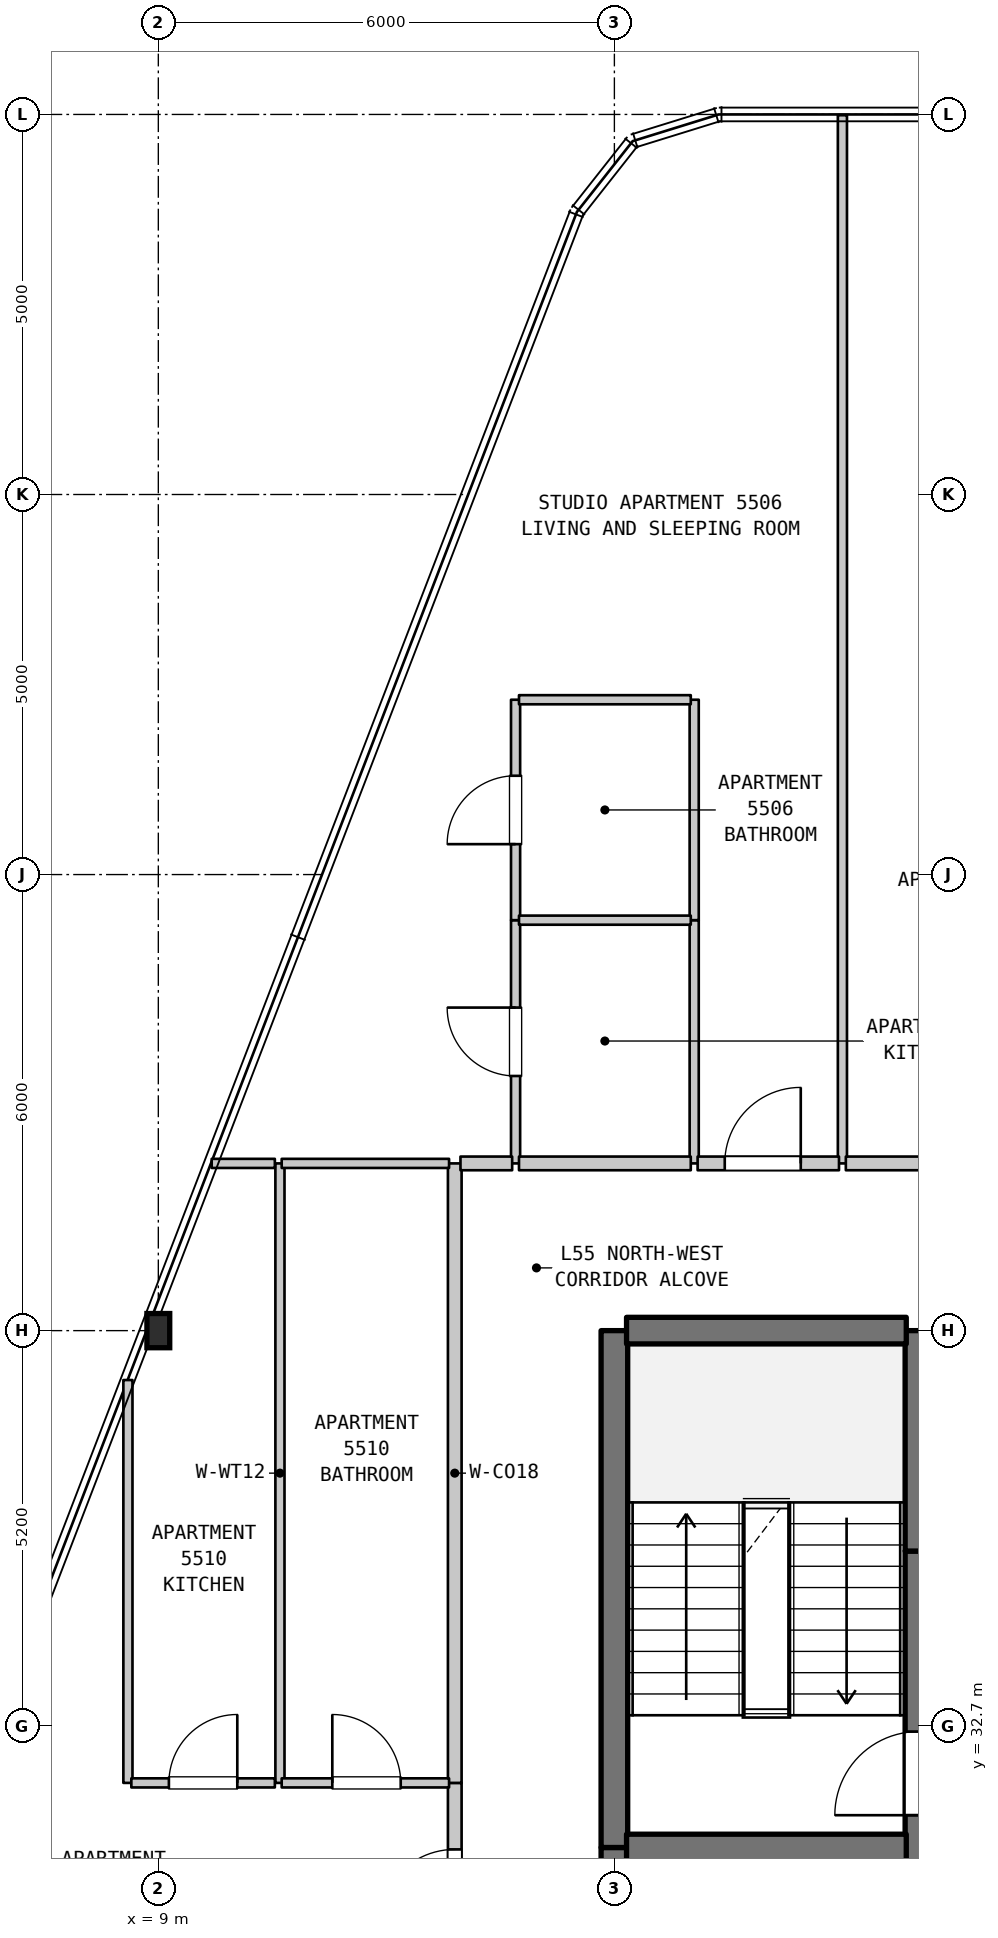
"""IFC4 building model, lengths in metres.
Left out: names, types, materials, properties, quantities, classifications, styles, units other than length and angle.
Written with IfcOpenShell. Run it as: python <this file> out.ifc"""

import sys

from ifc_helpers import new_model, si_unit, direction, frame, frame_2d, origin, origin_2d, place, context, subcontext, project, spatial, rectangle, i_section, extrude, element, fill, save


model = new_model("IFC4")
c1 = context("Model", 3, precision=1e-05, world=origin(), true_north=direction((0.0, 1.0)))
c2 = subcontext(c1, "Body", "Model", "MODEL_VIEW")
j1 = project(units=[si_unit("LENGTHUNIT", "METRE"), si_unit("PLANEANGLEUNIT", "RADIAN")], contexts=[c1])
p1 = place(None, origin())
s1 = spatial("IfcSite", under=j1, at=p1, CompositionType="ELEMENT")
p2 = place(p1, origin())
s2 = spatial("IfcBuilding", under=s1, at=p2, CompositionType="ELEMENT")
p3 = place(p2, frame((0.0, 0.0, 222.8)))
s3 = spatial("IfcBuildingStorey", under=s2, at=p3, CompositionType="ELEMENT", Elevation=222.8)
p4 = place(p3, frame((9.0, 37.9, 0.0), z_axis=(0.0, 0.0, 1.0), x_axis=(1.0, 0.0, 0.0)))
e1 = element("IfcColumn", 1, at=p4, inside=s3, PredefinedType="COLUMN", context=c2, shape_type="SweptSolid", body=[
    extrude(i_section(OverallWidth=0.3, OverallDepth=0.45, WebThickness=0.014, FlangeThickness=0.026, FilletRadius=0.027, at=origin_2d()), origin(), (0.0, 0.0, 1.0), 3.7),
])
p5 = place(p3, frame((8.6, 31.95, 0.0), z_axis=(0.0, 0.0, 1.0), x_axis=(0.0, 1.0, 0.0)))
e2 = element("IfcWall", 2, at=p5, inside=s3, PredefinedType="PARTITIONING", context=c2, shape_type="SweptSolid", body=[
    extrude(rectangle(XDim=5.3, YDim=0.12, at=frame_2d((2.65, 0.0))), origin(), (0.0, 0.0, 1.0), 3.39),
])
p6 = place(p3, frame((10.6, 31.95, 0.0), z_axis=(0.0, 0.0, 1.0), x_axis=(0.0, 1.0, 0.0)))
e3 = element("IfcWall", 3, at=p6, inside=s3, PredefinedType="PARTITIONING", context=c2, shape_type="SweptSolid", body=[
    extrude(rectangle(XDim=8.15, YDim=0.12, at=frame_2d((4.075, 0.0))), origin(), (0.0, 0.0, 1.0), 3.39),
])
p7 = place(p3, frame((12.9, 29.2, 0.0), z_axis=(0.0, 0.0, 1.0), x_axis=(0.0, 1.0, 0.0)))
e4 = element("IfcWall", 4, at=p7, inside=s3, PredefinedType="STANDARD", context=c2, shape_type="SweptSolid", body=[
    extrude(rectangle(XDim=2.75, YDim=0.18, at=frame_2d((1.375, 0.0))), origin(), (0.0, 0.0, 1.0), 3.39),
])
p8 = place(p7, frame((0.875, 0.0, 0.0)))
e5 = element("IfcOpeningElement", 5, at=p8, cuts=e4, PredefinedType="OPENING", context=c2, shape_type="SweptSolid", body=[
    extrude(rectangle(XDim=1.0, YDim=2.15, at=frame_2d((0.5, 1.075))), frame((0.0, 0.1, 0.0), z_axis=(0.0, -1.0, 0.0), x_axis=(1.0, 0.0, 0.0)), (0.0, 0.0, 1.0), 0.2),
])
p9 = place(p3, frame((12.9, 31.95, 0.0), z_axis=(0.0, 0.0, 1.0), x_axis=(0.0, 1.0, 0.0)))
e6 = element("IfcWall", 6, at=p9, inside=s3, PredefinedType="STANDARD", context=c2, shape_type="SweptSolid", body=[
    extrude(rectangle(XDim=8.15, YDim=0.18, at=frame_2d((4.075, 0.0))), origin(), (0.0, 0.0, 1.0), 3.39),
])
p10 = place(p3, frame((13.7, 40.1, 0.0), z_axis=(0.0, 0.0, 1.0), x_axis=(0.0, 1.0, 0.0)))
e7 = element("IfcWall", 7, at=p10, inside=s3, PredefinedType="PARTITIONING", context=c2, shape_type="SweptSolid", body=[
    extrude(rectangle(XDim=3.2, YDim=0.12, at=frame_2d((1.6, 0.0))), origin(), (0.0, 0.0, 1.0), 3.39),
])
p11 = place(p10, frame((1.15, 0.0, 0.0)))
e8 = element("IfcOpeningElement", 8, at=p11, cuts=e7, PredefinedType="OPENING", context=c2, shape_type="SweptSolid", body=[
    extrude(rectangle(XDim=0.9, YDim=2.15, at=frame_2d((0.45, 1.075))), frame((0.0, 0.07, 0.0), z_axis=(0.0, -1.0, 0.0), x_axis=(1.0, 0.0, 0.0)), (0.0, 0.0, 1.0), 0.14),
])
p12 = place(p3, frame((13.7, 43.3, 0.0), z_axis=(0.0, 0.0, 1.0), x_axis=(0.0, 1.0, 0.0)))
e9 = element("IfcWall", 9, at=p12, inside=s3, PredefinedType="PARTITIONING", context=c2, shape_type="SweptSolid", body=[
    extrude(rectangle(XDim=2.9, YDim=0.12, at=frame_2d((1.45, 0.0))), origin(), (0.0, 0.0, 1.0), 3.39),
])
p13 = place(p12, frame((1.0, 0.0, 0.0)))
e10 = element("IfcOpeningElement", 10, at=p13, cuts=e9, PredefinedType="OPENING", context=c2, shape_type="SweptSolid", body=[
    extrude(rectangle(XDim=0.9, YDim=2.1, at=frame_2d((0.45, 1.05))), frame((0.0, 0.07, 0.0), z_axis=(0.0, -1.0, 0.0), x_axis=(1.0, 0.0, 0.0)), (0.0, 0.0, 1.0), 0.14),
])
p14 = place(p3, frame((15.0, 29.5, 0.0), z_axis=(0.0, 0.0, 1.0), x_axis=(0.0, 1.0, 0.0)))
e11 = element("IfcWall", 11, at=p14, inside=s3, PredefinedType="SHEAR", context=c2, shape_type="SweptSolid", body=[
    extrude(rectangle(XDim=1.6, YDim=0.35, at=frame_2d((0.8, 0.0))), origin(), (0.0, 0.0, 1.0), 3.39),
])
p15 = place(p14, frame((0.287, 0.0, 0.0)))
e12 = element("IfcOpeningElement", 12, at=p15, cuts=e11, PredefinedType="OPENING", context=c2, shape_type="SweptSolid", body=[
    extrude(rectangle(XDim=0.85, YDim=2.1, at=frame_2d((0.425, 1.05))), frame((0.0, 0.185, 0.0), z_axis=(0.0, -1.0, 0.0), x_axis=(1.0, 0.0, 0.0)), (0.0, 0.0, 1.0), 0.37),
])
p16 = place(p3, frame((15.0, 31.1, 0.0), z_axis=(0.0, 0.0, 1.0), x_axis=(0.0, 1.0, 0.0)))
e13 = element("IfcWall", 13, at=p16, inside=s3, PredefinedType="SHEAR", context=c2, shape_type="SweptSolid", body=[
    extrude(rectangle(XDim=6.8, YDim=0.35, at=frame_2d((3.4, 0.0))), origin(), (0.0, 0.0, 1.0), 3.39),
])
p17 = place(p3, frame((16.05, 40.1, 0.0), z_axis=(0.0, 0.0, 1.0), x_axis=(0.0, 1.0, 0.0)))
e14 = element("IfcWall", 14, at=p17, inside=s3, PredefinedType="PARTITIONING", context=c2, shape_type="SweptSolid", body=[
    extrude(rectangle(XDim=3.2, YDim=0.12, at=frame_2d((1.6, 0.0))), origin(), (0.0, 0.0, 1.0), 3.39),
])
p18 = place(p3, frame((16.05, 43.3, 0.0), z_axis=(0.0, 0.0, 1.0), x_axis=(0.0, 1.0, 0.0)))
e15 = element("IfcWall", 15, at=p18, inside=s3, PredefinedType="PARTITIONING", context=c2, shape_type="SweptSolid", body=[
    extrude(rectangle(XDim=2.9, YDim=0.12, at=frame_2d((1.45, 0.0))), origin(), (0.0, 0.0, 1.0), 3.39),
])
p19 = place(p3, frame((18.0, 40.1, 0.0), z_axis=(0.0, 0.0, 1.0), x_axis=(0.0, 1.0, 0.0)))
e16 = element("IfcWall", 16, at=p19, inside=s3, PredefinedType="PARTITIONING", context=c2, shape_type="SweptSolid", body=[
    extrude(rectangle(XDim=13.79, YDim=0.12, at=frame_2d((6.895, 0.0))), origin(), (0.0, 0.0, 1.0), 3.39),
])
p20 = place(p3, frame((19.0, 29.5, 0.0), z_axis=(0.0, 0.0, 1.0), x_axis=(0.0, 1.0, 0.0)))
e17 = element("IfcWall", 17, at=p20, inside=s3, PredefinedType="SHEAR", context=c2, shape_type="SweptSolid", body=[
    extrude(rectangle(XDim=5.5, YDim=0.35, at=frame_2d((2.75, 0.0))), origin(), (0.0, 0.0, 1.0), 3.39),
])
p21 = place(p20, frame((2.025, 0.0, 0.0)))
e18 = element("IfcOpeningElement", 18, at=p21, cuts=e17, PredefinedType="OPENING", context=c2, shape_type="SweptSolid", body=[
    extrude(rectangle(XDim=1.1, YDim=2.15, at=frame_2d((0.55, 1.075))), frame((0.0, 0.185, 0.0), z_axis=(0.0, -1.0, 0.0), x_axis=(1.0, 0.0, 0.0)), (0.0, 0.0, 1.0), 0.37),
])
p22 = place(p3, frame((19.0, 35.0, 0.0), z_axis=(0.0, 0.0, 1.0), x_axis=(0.0, 1.0, 0.0)))
e19 = element("IfcWall", 19, at=p22, inside=s3, PredefinedType="SHEAR", context=c2, shape_type="SweptSolid", body=[
    extrude(rectangle(XDim=2.9, YDim=0.35, at=frame_2d((1.45, 0.0))), origin(), (0.0, 0.0, 1.0), 3.39),
])
p23 = place(p3, frame((15.16, 31.1, 0.0), z_axis=(0.0, 0.0, 1.0), x_axis=(1.0, 0.0, 0.0)))
e20 = element("IfcWall", 20, at=p23, inside=s3, PredefinedType="SHEAR", context=c2, shape_type="SweptSolid", body=[
    extrude(rectangle(XDim=3.68, YDim=0.35, at=frame_2d((1.84, 0.0))), origin(), (0.0, 0.0, 1.0), 3.39),
])
p24 = place(p3, frame((8.645, 31.95, 0.0), z_axis=(0.0, 0.0, 1.0), x_axis=(1.0, 0.0, 0.0)))
e21 = element("IfcWall", 21, at=p24, inside=s3, PredefinedType="PARTITIONING", context=c2, shape_type="SweptSolid", body=[
    extrude(rectangle(XDim=1.888, YDim=0.12, at=frame_2d((0.944, 0.0))), origin(), (0.0, 0.0, 1.0), 3.39),
])
p25 = place(p24, frame((0.494, 0.0, 0.0)))
e22 = element("IfcOpeningElement", 22, at=p25, cuts=e21, PredefinedType="OPENING", context=c2, shape_type="SweptSolid", body=[
    extrude(rectangle(XDim=0.9, YDim=2.15, at=frame_2d((0.45, 1.075))), frame((0.0, 0.07, 0.0), z_axis=(0.0, -1.0, 0.0), x_axis=(1.0, 0.0, 0.0)), (0.0, 0.0, 1.0), 0.14),
])
p26 = place(p3, frame((10.623, 31.95, 0.0), z_axis=(0.0, 0.0, 1.0), x_axis=(1.0, 0.0, 0.0)))
e23 = element("IfcWall", 23, at=p26, inside=s3, PredefinedType="PARTITIONING", context=c2, shape_type="SweptSolid", body=[
    extrude(rectangle(XDim=2.202, YDim=0.12, at=frame_2d((1.101, 0.0))), origin(), (0.0, 0.0, 1.0), 3.39),
])
p27 = place(p26, frame((0.666, 0.0, 0.0)))
e24 = element("IfcOpeningElement", 24, at=p27, cuts=e23, PredefinedType="OPENING", context=c2, shape_type="SweptSolid", body=[
    extrude(rectangle(XDim=0.9, YDim=2.1, at=frame_2d((0.45, 1.05))), frame((0.0, 0.07, 0.0), z_axis=(0.0, -1.0, 0.0), x_axis=(1.0, 0.0, 0.0)), (0.0, 0.0, 1.0), 0.14),
])
p28 = place(p3, frame((15.16, 37.9, 0.0), z_axis=(0.0, 0.0, 1.0), x_axis=(1.0, 0.0, 0.0)))
e25 = element("IfcWall", 25, at=p28, inside=s3, PredefinedType="SHEAR", context=c2, shape_type="SweptSolid", body=[
    extrude(rectangle(XDim=3.68, YDim=0.35, at=frame_2d((1.84, 0.0))), origin(), (0.0, 0.0, 1.0), 3.39),
])
p29 = place(p3, frame((9.702, 40.1, 0.0), z_axis=(0.0, 0.0, 1.0), x_axis=(1.0, 0.0, 0.0)))
e26 = element("IfcWall", 26, at=p29, inside=s3, PredefinedType="PARTITIONING", context=c2, shape_type="SweptSolid", body=[
    extrude(rectangle(XDim=0.831, YDim=0.12, at=frame_2d((0.416, 0.0))), origin(), (0.0, 0.0, 1.0), 3.39),
])
p30 = place(p3, frame((10.623, 40.1, 0.0), z_axis=(0.0, 0.0, 1.0), x_axis=(1.0, 0.0, 0.0)))
e27 = element("IfcWall", 27, at=p30, inside=s3, PredefinedType="PARTITIONING", context=c2, shape_type="SweptSolid", body=[
    extrude(rectangle(XDim=2.202, YDim=0.12, at=frame_2d((1.101, 0.0))), origin(), (0.0, 0.0, 1.0), 3.39),
])
p31 = place(p3, frame((12.975, 40.1, 0.0), z_axis=(0.0, 0.0, 1.0), x_axis=(1.0, 0.0, 0.0)))
e28 = element("IfcWall", 28, at=p31, inside=s3, PredefinedType="STANDARD", context=c2, shape_type="SweptSolid", body=[
    extrude(rectangle(XDim=0.68, YDim=0.18, at=frame_2d((0.34, 0.0))), origin(), (0.0, 0.0, 1.0), 3.39),
])
p32 = place(p3, frame((13.745, 40.1, 0.0), z_axis=(0.0, 0.0, 1.0), x_axis=(1.0, 0.0, 0.0)))
e29 = element("IfcWall", 29, at=p32, inside=s3, PredefinedType="STANDARD", context=c2, shape_type="SweptSolid", body=[
    extrude(rectangle(XDim=2.26, YDim=0.18, at=frame_2d((1.13, 0.0))), origin(), (0.0, 0.0, 1.0), 3.39),
])
p33 = place(p3, frame((16.095, 40.1, 0.0), z_axis=(0.0, 0.0, 1.0), x_axis=(1.0, 0.0, 0.0)))
e30 = element("IfcWall", 30, at=p33, inside=s3, PredefinedType="STANDARD", context=c2, shape_type="SweptSolid", body=[
    extrude(rectangle(XDim=1.86, YDim=0.18, at=frame_2d((0.93, 0.0))), origin(), (0.0, 0.0, 1.0), 3.39),
])
p34 = place(p33, frame((0.357, 0.0, 0.0)))
e31 = element("IfcOpeningElement", 31, at=p34, cuts=e30, PredefinedType="OPENING", context=c2, shape_type="SweptSolid", body=[
    extrude(rectangle(XDim=1.0, YDim=2.15, at=frame_2d((0.5, 1.075))), frame((0.0, 0.1, 0.0), z_axis=(0.0, -1.0, 0.0), x_axis=(1.0, 0.0, 0.0)), (0.0, 0.0, 1.0), 0.2),
])
p35 = place(p3, frame((18.045, 40.1, 0.0), z_axis=(0.0, 0.0, 1.0), x_axis=(1.0, 0.0, 0.0)))
e32 = element("IfcWall", 32, at=p35, inside=s3, PredefinedType="STANDARD", context=c2, shape_type="SweptSolid", body=[
    extrude(rectangle(XDim=4.21, YDim=0.18, at=frame_2d((2.105, 0.0))), origin(), (0.0, 0.0, 1.0), 3.39),
])
p36 = place(p35, frame((1.605, 0.0, 0.0)))
e33 = element("IfcOpeningElement", 33, at=p36, cuts=e32, PredefinedType="OPENING", context=c2, shape_type="SweptSolid", body=[
    extrude(rectangle(XDim=1.0, YDim=2.15, at=frame_2d((0.5, 1.075))), frame((0.0, 0.1, 0.0), z_axis=(0.0, -1.0, 0.0), x_axis=(1.0, 0.0, 0.0)), (0.0, 0.0, 1.0), 0.2),
])
for number, where, z_axis, x_axis in (
    (34, (13.745, 43.3, 0.0), (0.0, 0.0, 1.0), (1.0, 0.0, 0.0)),
    (35, (13.745, 46.2, 0.0), (0.0, 0.0, 1.0), (1.0, 0.0, 0.0)),
):
    element("IfcWall", number, at=place(p3, frame(where, z_axis=z_axis, x_axis=x_axis)), inside=s3, PredefinedType="PARTITIONING", context=c2, shape_type="SweptSolid", body=[
        extrude(rectangle(XDim=2.26, YDim=0.12, at=frame_2d((1.13, 0.0))), origin(), (0.0, 0.0, 1.0), 3.39),
    ])
p37 = place(p8, origin())
e36 = element("IfcDoor", 36, at=p37, inside=s3, OperationType="SINGLE_SWING_LEFT", PredefinedType="DOOR", context=c2, shape_type="SweptSolid", body=[
    extrude(rectangle(XDim=1.0, YDim=2.15, at=frame_2d((0.5, 1.075))), frame((0.0, 0.025, 0.0), z_axis=(0.0, -1.0, 0.0), x_axis=(1.0, 0.0, 0.0)), (0.0, 0.0, 1.0), 0.05),
])
fill(e5, e36)
p38 = place(p11, origin())
e37 = element("IfcDoor", 37, at=p38, inside=s3, OperationType="SINGLE_SWING_RIGHT", PredefinedType="DOOR", context=c2, shape_type="SweptSolid", body=[
    extrude(rectangle(XDim=0.9, YDim=2.15, at=frame_2d((0.45, 1.075))), frame((0.0, 0.025, 0.0), z_axis=(0.0, -1.0, 0.0), x_axis=(1.0, 0.0, 0.0)), (0.0, 0.0, 1.0), 0.05),
])
fill(e8, e37)
p39 = place(p13, origin())
e38 = element("IfcDoor", 38, at=p39, inside=s3, OperationType="SINGLE_SWING_LEFT", PredefinedType="DOOR", context=c2, shape_type="SweptSolid", body=[
    extrude(rectangle(XDim=0.9, YDim=2.1, at=frame_2d((0.45, 1.05))), frame((0.0, 0.025, 0.0), z_axis=(0.0, -1.0, 0.0), x_axis=(1.0, 0.0, 0.0)), (0.0, 0.0, 1.0), 0.05),
])
fill(e10, e38)
p40 = place(p21, origin())
e39 = element("IfcDoor", 39, at=p40, inside=s3, OperationType="SINGLE_SWING_LEFT", PredefinedType="DOOR", context=c2, shape_type="SweptSolid", body=[
    extrude(rectangle(XDim=1.1, YDim=2.15, at=frame_2d((0.55, 1.075))), frame((0.0, 0.025, 0.0), z_axis=(0.0, -1.0, 0.0), x_axis=(1.0, 0.0, 0.0)), (0.0, 0.0, 1.0), 0.05),
])
fill(e18, e39)
p41 = place(p25, origin())
e40 = element("IfcDoor", 40, at=p41, inside=s3, OperationType="SINGLE_SWING_RIGHT", PredefinedType="DOOR", context=c2, shape_type="SweptSolid", body=[
    extrude(rectangle(XDim=0.9, YDim=2.15, at=frame_2d((0.45, 1.075))), frame((0.0, 0.025, 0.0), z_axis=(0.0, -1.0, 0.0), x_axis=(1.0, 0.0, 0.0)), (0.0, 0.0, 1.0), 0.05),
])
fill(e22, e40)
p42 = place(p27, origin())
e41 = element("IfcDoor", 41, at=p42, inside=s3, OperationType="SINGLE_SWING_LEFT", PredefinedType="DOOR", context=c2, shape_type="SweptSolid", body=[
    extrude(rectangle(XDim=0.9, YDim=2.1, at=frame_2d((0.45, 1.05))), frame((0.0, 0.025, 0.0), z_axis=(0.0, -1.0, 0.0), x_axis=(1.0, 0.0, 0.0)), (0.0, 0.0, 1.0), 0.05),
])
fill(e24, e41)
p43 = place(p34, origin())
e42 = element("IfcDoor", 42, at=p43, inside=s3, OperationType="SINGLE_SWING_RIGHT", PredefinedType="DOOR", context=c2, shape_type="SweptSolid", body=[
    extrude(rectangle(XDim=1.0, YDim=2.15, at=frame_2d((0.5, 1.075))), frame((0.0, 0.025, 0.0), z_axis=(0.0, -1.0, 0.0), x_axis=(1.0, 0.0, 0.0)), (0.0, 0.0, 1.0), 0.05),
])
fill(e31, e42)
save(model, sys.argv[1])
